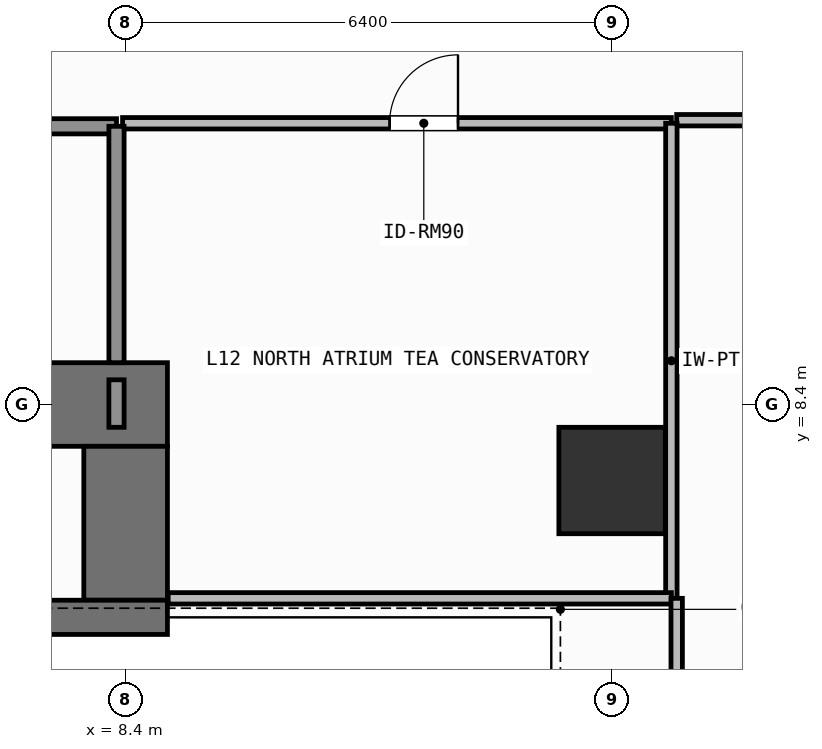
"""IFC4 building model, lengths in metres.
Left out: names, types, materials, properties, quantities, classifications, styles, units other than length and angle.
Written with IfcOpenShell. Run it as: python <this file> out.ifc"""

import sys

from ifc_helpers import new_model, si_unit, direction, frame, frame_2d, origin, origin_2d, place, context, subcontext, project, spatial, rectangle, extrude, element, fill, save


model = new_model("IFC4")
c1 = context("Model", 3, precision=1e-05, world=origin(), true_north=direction((0.0, 1.0)))
c2 = subcontext(c1, "Body", "Model", "MODEL_VIEW")
j1 = project(units=[si_unit("LENGTHUNIT", "METRE"), si_unit("PLANEANGLEUNIT", "RADIAN")], contexts=[c1])
p1 = place(None, origin())
s1 = spatial("IfcSite", under=j1, at=p1, CompositionType="ELEMENT")
p2 = place(p1, origin())
s2 = spatial("IfcBuilding", under=s1, at=p2, CompositionType="ELEMENT")
p3 = place(p2, frame((0.0, 0.0, 46.2)))
s3 = spatial("IfcBuildingStorey", under=s2, at=p3, CompositionType="ELEMENT", Elevation=46.2)
p4 = place(p3, frame((-7.55, 8.4, 0.0), z_axis=(0.0, 0.0, 1.0), x_axis=(1.0, 0.0, 0.0)))
e1 = element("IfcWall", 1, at=p4, inside=s3, PredefinedType="SHEAR", context=c2, shape_type="SweptSolid", body=[
    extrude(rectangle(XDim=16.5, YDim=1.1, at=frame_2d((8.25, 0.0))), origin(), (0.0, 0.0, 1.0), 3.9),
])
p5 = place(p3, frame((8.4, 5.825, 0.0), z_axis=(0.0, 0.0, 1.0), x_axis=(0.0, 1.0, 0.0)))
e2 = element("IfcWall", 2, at=p5, inside=s3, PredefinedType="SHEAR", context=c2, shape_type="SweptSolid", body=[
    extrude(rectangle(XDim=2.025, YDim=1.1, at=frame_2d((1.013, 0.0))), origin(), (0.0, 0.0, 1.0), 3.9),
])
p6 = place(p3, frame((3.045, 5.6, 0.0), z_axis=(0.0, 0.0, 1.0), x_axis=(1.0, 0.0, 0.0)))
e3 = element("IfcWall", 3, at=p6, inside=s3, PredefinedType="SHEAR", context=c2, shape_type="SweptSolid", body=[
    extrude(rectangle(XDim=5.905, YDim=0.45, at=frame_2d((2.953, 0.0))), origin(), (0.0, 0.0, 1.0), 3.9),
])
p7 = place(p3, frame((14.8, 7.4, 0.0), z_axis=(0.0, 0.0, 1.0), x_axis=(1.0, 0.0, 0.0)))
e4 = element("IfcColumn", 4, at=p7, inside=s3, PredefinedType="COLUMN", context=c2, shape_type="SweptSolid", body=[
    extrude(rectangle(XDim=1.4, YDim=1.4, at=origin_2d()), origin(), (0.0, 0.0, 1.0), 3.9),
])
p8 = place(p3, frame((4.58, 12.06, 0.0), z_axis=(0.0, 0.0, 1.0), x_axis=(1.0, 0.0, 0.0)))
e5 = element("IfcWall", 5, at=p8, inside=s3, PredefinedType="SOLIDWALL", context=c2, shape_type="SweptSolid", body=[
    extrude(rectangle(XDim=3.7, YDim=0.2, at=frame_2d((1.85, 0.0))), origin(), (0.0, 0.0, 1.0), 3.68),
])
p9 = place(p8, frame((1.212, 0.0, 0.0)))
e6 = element("IfcOpeningElement", 6, at=p9, cuts=e5, PredefinedType="OPENING", context=c2, shape_type="SweptSolid", body=[
    extrude(rectangle(XDim=1.1, YDim=2.15, at=frame_2d((0.55, 1.075))), frame((0.0, 0.11, 0.0), z_axis=(0.0, -1.0, 0.0), x_axis=(1.0, 0.0, 0.0)), (0.0, 0.0, 1.0), 0.22),
])
p10 = place(p3, frame((8.36, 12.1, 0.0), z_axis=(0.0, 0.0, 1.0), x_axis=(1.0, 0.0, 0.0)))
e7 = element("IfcWall", 7, at=p10, inside=s3, PredefinedType="PARTITIONING", context=c2, shape_type="SweptSolid", body=[
    extrude(rectangle(XDim=7.22, YDim=0.15, at=frame_2d((3.61, 0.0))), origin(), (0.0, 0.0, 1.0), 3.68),
])
p11 = place(p10, frame((3.513, 0.0, 0.0)))
e8 = element("IfcOpeningElement", 8, at=p11, cuts=e7, PredefinedType="OPENING", context=c2, shape_type="SweptSolid", body=[
    extrude(rectangle(XDim=0.9, YDim=2.1, at=frame_2d((0.45, 1.05))), frame((0.0, 0.085, 0.0), z_axis=(0.0, -1.0, 0.0), x_axis=(1.0, 0.0, 0.0)), (0.0, 0.0, 1.0), 0.17),
])
p12 = place(p3, frame((15.65, 12.14, 0.0), z_axis=(0.0, 0.0, 1.0), x_axis=(1.0, 0.0, 0.0)))
e9 = element("IfcWall", 9, at=p12, inside=s3, PredefinedType="PARTITIONING", context=c2, shape_type="SweptSolid", body=[
    extrude(rectangle(XDim=12.27, YDim=0.15, at=frame_2d((6.135, 0.0))), origin(), (0.0, 0.0, 1.0), 3.68),
])
p13 = place(p12, frame((5.15, 0.0, 0.0)))
e10 = element("IfcOpeningElement", 10, at=p13, cuts=e9, PredefinedType="OPENING", context=c2, shape_type="SweptSolid", body=[
    extrude(rectangle(XDim=0.9, YDim=2.1, at=frame_2d((0.45, 1.05))), frame((0.0, 0.085, 0.0), z_axis=(0.0, -1.0, 0.0), x_axis=(1.0, 0.0, 0.0)), (0.0, 0.0, 1.0), 0.17),
])
p14 = place(p3, frame((8.28, 8.95, 0.0), z_axis=(0.0, 0.0, 1.0), x_axis=(0.0, 1.0, 0.0)))
e11 = element("IfcWall", 11, at=p14, inside=s3, PredefinedType="SOLIDWALL", context=c2, shape_type="SweptSolid", body=[
    extrude(rectangle(XDim=3.11, YDim=0.2, at=frame_2d((1.555, 0.0))), origin(), (0.0, 0.0, 1.0), 3.68),
])
p15 = place(p3, frame((8.28, 8.1, 0.0), z_axis=(0.0, 0.0, 1.0), x_axis=(0.0, 1.0, 0.0)))
e12 = element("IfcWall", 12, at=p15, inside=s3, PredefinedType="SOLIDWALL", context=c2, shape_type="SweptSolid", body=[
    extrude(rectangle(XDim=0.625, YDim=0.2, at=frame_2d((0.312, 0.0))), origin(), (0.0, 0.0, 1.0), 3.68),
])
p16 = place(p3, frame((15.58, 5.85, 0.0), z_axis=(0.0, 0.0, 1.0), x_axis=(0.0, 1.0, 0.0)))
e13 = element("IfcWall", 13, at=p16, inside=s3, PredefinedType="PARTITIONING", context=c2, shape_type="SweptSolid", body=[
    extrude(rectangle(XDim=6.25, YDim=0.15, at=frame_2d((3.125, 0.0))), origin(), (0.0, 0.0, 1.0), 3.68),
])
p17 = place(p3, frame((8.96, 5.85, 0.0), z_axis=(0.0, 0.0, 1.0), x_axis=(1.0, 0.0, 0.0)))
e14 = element("IfcWall", 14, at=p17, inside=s3, PredefinedType="PARTITIONING", context=c2, shape_type="SweptSolid", body=[
    extrude(rectangle(XDim=6.62, YDim=0.15, at=frame_2d((3.31, 0.0))), origin(), (0.0, 0.0, 1.0), 3.68),
])
p18 = place(p3, frame((15.65, -2.75, 0.0), z_axis=(0.0, 0.0, 1.0), x_axis=(0.0, 1.0, 0.0)))
e15 = element("IfcWall", 15, at=p18, inside=s3, PredefinedType="PARTITIONING", context=c2, shape_type="SweptSolid", body=[
    extrude(rectangle(XDim=8.6, YDim=0.15, at=frame_2d((4.3, 0.0))), origin(), (0.0, 0.0, 1.0), 3.68),
])
p19 = place(p11, origin())
e16 = element("IfcDoor", 16, at=p19, inside=s3, OperationType="SINGLE_SWING_RIGHT", PredefinedType="DOOR", context=c2, shape_type="SweptSolid", body=[
    extrude(rectangle(XDim=0.9, YDim=2.1, at=frame_2d((0.45, 1.05))), frame((0.0, 0.025, 0.0), z_axis=(0.0, -1.0, 0.0), x_axis=(1.0, 0.0, 0.0)), (0.0, 0.0, 1.0), 0.05),
])
fill(e8, e16)
save(model, sys.argv[1])
